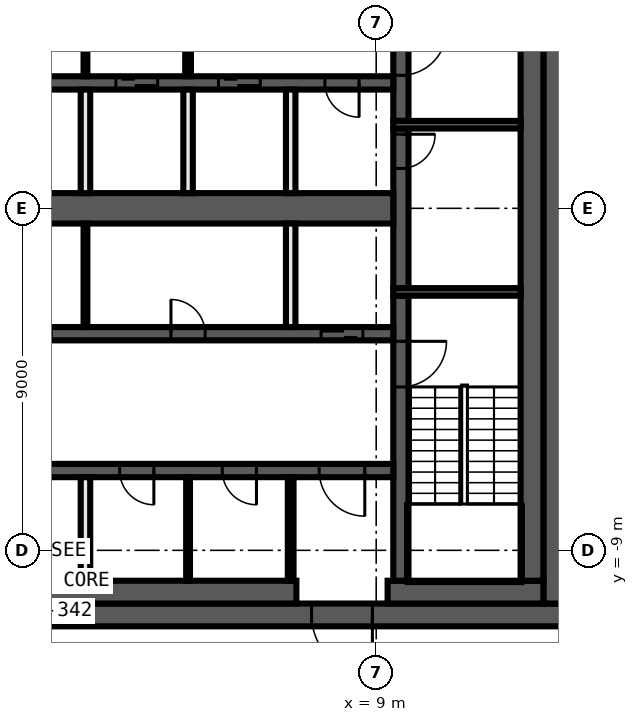
"""IFC4 building model, lengths in metres.
Left out: names, types, materials, properties, quantities, classifications, styles, units other than length and angle.
Written with IfcOpenShell. Run it as: python <this file> out.ifc"""

import sys

from ifc_helpers import new_model, si_unit, direction, frame, frame_2d, origin, place, context, subcontext, project, spatial, rectangle, extrude, element, fill, save


model = new_model("IFC4")
c1 = context("Model", 3, precision=1e-05, world=origin(), true_north=direction((0.0, 1.0)))
c2 = subcontext(c1, "Body", "Model", "MODEL_VIEW")
j1 = project(units=[si_unit("LENGTHUNIT", "METRE"), si_unit("PLANEANGLEUNIT", "RADIAN")], contexts=[c1])
p1 = place(None, origin())
s1 = spatial("IfcSite", under=j1, at=p1, CompositionType="ELEMENT")
p2 = place(p1, origin())
s2 = spatial("IfcBuilding", under=s1, at=p2, CompositionType="ELEMENT")
p3 = place(p2, frame((0.0, 0.0, 359.0)))
s3 = spatial("IfcBuildingStorey", under=s2, at=p3, CompositionType="ELEMENT", Elevation=359.0)
p4 = place(p3, frame((11.367, -20.469, 0.0), z_axis=(0.0, 0.0, 1.0), x_axis=(0.424125024155, 0.905603646131, 0.0)))
e1 = element("IfcWall", 1, at=p4, inside=s3, PredefinedType="SOLIDWALL", context=c2, shape_type="SweptSolid", body=[
    extrude(rectangle(XDim=28.801, YDim=0.25, at=frame_2d((14.401, 0.0))), origin(), (0.0, 0.0, 1.0), 3.8),
])
p5 = place(p3, frame((14.0, -10.7, 0.0), z_axis=(0.0, 0.0, 1.0), x_axis=(-1.0, 0.0, 0.0)))
e2 = element("IfcWall", 2, at=p5, inside=s3, PredefinedType="SHEAR", context=c2, shape_type="SweptSolid", body=[
    extrude(rectangle(XDim=28.0, YDim=0.6, at=frame_2d((14.0, 0.0))), origin(), (0.0, 0.0, 1.0), 3.8),
])
p6 = place(p5, frame((5.1, 0.0, 0.0)))
e3 = element("IfcOpeningElement", 3, at=p6, cuts=e2, PredefinedType="OPENING", context=c2, shape_type="SweptSolid", body=[
    extrude(rectangle(XDim=1.6, YDim=2.1, at=frame_2d((0.8, 1.05))), frame((0.0, 0.31, 0.0), z_axis=(0.0, -1.0, 0.0), x_axis=(1.0, 0.0, 0.0)), (0.0, 0.0, 1.0), 0.62),
])
p7 = place(p3, frame((13.7, 10.4, 0.0), z_axis=(0.0, 0.0, 1.0), x_axis=(0.0, -1.0, 0.0)))
e4 = element("IfcWall", 4, at=p7, inside=s3, PredefinedType="SHEAR", context=c2, shape_type="SweptSolid", body=[
    extrude(rectangle(XDim=20.8, YDim=0.6, at=frame_2d((10.4, 0.0))), origin(), (0.0, 0.0, 1.0), 3.8),
])
p8 = place(p3, frame((13.4, -10.1, 0.0), z_axis=(0.0, 0.0, 1.0), x_axis=(-1.0, 0.0, 0.0)))
e5 = element("IfcWall", 5, at=p8, inside=s3, PredefinedType="SHEAR", context=c2, shape_type="SweptSolid", body=[
    extrude(rectangle(XDim=4.1, YDim=0.6, at=frame_2d((2.05, 0.0))), origin(), (0.0, 0.0, 1.0), 3.8),
])
p9 = place(p3, frame((6.9, -10.1, 0.0), z_axis=(0.0, 0.0, 1.0), x_axis=(-1.0, 0.0, 0.0)))
e6 = element("IfcWall", 6, at=p9, inside=s3, PredefinedType="SHEAR", context=c2, shape_type="SweptSolid", body=[
    extrude(rectangle(XDim=20.3, YDim=0.6, at=frame_2d((10.15, 0.0))), origin(), (0.0, 0.0, 1.0), 3.8),
])
p10 = place(p3, frame((13.1, 9.8, 0.0), z_axis=(0.0, 0.0, 1.0), x_axis=(0.0, -1.0, 0.0)))
e7 = element("IfcWall", 7, at=p10, inside=s3, PredefinedType="SHEAR", context=c2, shape_type="SweptSolid", body=[
    extrude(rectangle(XDim=19.6, YDim=0.6, at=frame_2d((9.8, 0.0))), origin(), (0.0, 0.0, 1.0), 3.8),
])
p11 = place(p3, frame((9.65, -2.3, 0.0), z_axis=(0.0, 0.0, 1.0), x_axis=(0.0, -1.0, 0.0)))
e8 = element("IfcWall", 8, at=p11, inside=s3, PredefinedType="SHEAR", context=c2, shape_type="SweptSolid", body=[
    extrude(rectangle(XDim=7.5, YDim=0.4, at=frame_2d((3.75, 0.0))), origin(), (0.0, 0.0, 1.0), 3.8),
])
p12 = place(p11, frame((1.2, 0.0, 0.0)))
e9 = element("IfcOpeningElement", 9, at=p12, cuts=e8, PredefinedType="OPENING", context=c2, shape_type="SweptSolid", body=[
    extrude(rectangle(XDim=1.2, YDim=2.1, at=frame_2d((0.6, 1.05))), frame((0.0, 0.21, 0.0), z_axis=(0.0, -1.0, 0.0), x_axis=(1.0, 0.0, 0.0)), (0.0, 0.0, 1.0), 0.42),
])
p13 = place(p3, frame((9.65, 2.1, 0.0), z_axis=(0.0, 0.0, 1.0), x_axis=(0.0, -1.0, 0.0)))
e10 = element("IfcWall", 10, at=p13, inside=s3, PredefinedType="SHEAR", context=c2, shape_type="SweptSolid", body=[
    extrude(rectangle(XDim=4.2, YDim=0.4, at=frame_2d((2.1, 0.0))), origin(), (0.0, 0.0, 1.0), 3.8),
])
p14 = place(p13, frame((0.15, 0.0, 0.0)))
e11 = element("IfcOpeningElement", 11, at=p14, cuts=e10, PredefinedType="OPENING", context=c2, shape_type="SweptSolid", body=[
    extrude(rectangle(XDim=0.9, YDim=2.1, at=frame_2d((0.45, 1.05))), frame((0.0, 0.21, 0.0), z_axis=(0.0, -1.0, 0.0), x_axis=(1.0, 0.0, 0.0)), (0.0, 0.0, 1.0), 0.42),
])
p15 = place(p3, frame((9.65, 9.8, 0.0), z_axis=(0.0, 0.0, 1.0), x_axis=(0.0, -1.0, 0.0)))
e12 = element("IfcWall", 12, at=p15, inside=s3, PredefinedType="SHEAR", context=c2, shape_type="SweptSolid", body=[
    extrude(rectangle(XDim=7.5, YDim=0.4, at=frame_2d((3.75, 0.0))), origin(), (0.0, 0.0, 1.0), 3.8),
])
p16 = place(p15, frame((5.1, 0.0, 0.0)))
e13 = element("IfcOpeningElement", 13, at=p16, cuts=e12, PredefinedType="OPENING", context=c2, shape_type="SweptSolid", body=[
    extrude(rectangle(XDim=1.2, YDim=2.1, at=frame_2d((0.6, 1.05))), frame((0.0, 0.21, 0.0), z_axis=(0.0, -1.0, 0.0), x_axis=(1.0, 0.0, 0.0)), (0.0, 0.0, 1.0), 0.42),
])
for number, where, z_axis, x_axis in (
    (14, (9.45, 2.2, 0.0), (0.0, 0.0, 1.0), (1.0, 0.0, 0.0)),
    (15, (9.45, -2.2, 0.0), (0.0, 0.0, 1.0), (1.0, 0.0, 0.0)),
):
    element("IfcWall", number, at=place(p3, frame(where, z_axis=z_axis, x_axis=x_axis)), inside=s3, PredefinedType="SHEAR", context=c2, shape_type="SweptSolid", body=[
        extrude(rectangle(XDim=3.35, YDim=0.2, at=frame_2d((1.675, 0.0))), origin(), (0.0, 0.0, 1.0), 3.8),
    ])
p17 = place(p3, frame((9.45, 3.3, 0.0), z_axis=(0.0, 0.0, 1.0), x_axis=(-1.0, 0.0, 0.0)))
e16 = element("IfcWall", 16, at=p17, inside=s3, PredefinedType="SHEAR", context=c2, shape_type="SweptSolid", body=[
    extrude(rectangle(XDim=18.9, YDim=0.35, at=frame_2d((9.45, 0.0))), origin(), (0.0, 0.0, 1.0), 3.8),
])
p18 = place(p17, frame((6.2, 0.0, 0.0)))
e17 = element("IfcOpeningElement", 17, at=p18, cuts=e16, PredefinedType="OPENING", context=c2, shape_type="SweptSolid", body=[
    extrude(rectangle(XDim=1.1, YDim=2.1, at=frame_2d((0.55, 1.05))), frame((0.0, 0.185, 0.0), z_axis=(0.0, -1.0, 0.0), x_axis=(1.0, 0.0, 0.0)), (0.0, 0.0, 1.0), 0.37),
])
p19 = place(p17, frame((3.5, 0.0, 0.0)))
e18 = element("IfcOpeningElement", 18, at=p19, cuts=e16, PredefinedType="OPENING", context=c2, shape_type="SweptSolid", body=[
    extrude(rectangle(XDim=1.1, YDim=2.1, at=frame_2d((0.55, 1.05))), frame((0.0, 0.185, 0.0), z_axis=(0.0, -1.0, 0.0), x_axis=(1.0, 0.0, 0.0)), (0.0, 0.0, 1.0), 0.37),
])
p20 = place(p17, frame((0.9, 0.0, 0.0)))
e19 = element("IfcOpeningElement", 19, at=p20, cuts=e16, PredefinedType="OPENING", context=c2, shape_type="SweptSolid", body=[
    extrude(rectangle(XDim=0.9, YDim=2.1, at=frame_2d((0.45, 1.05))), frame((0.0, 0.185, 0.0), z_axis=(0.0, -1.0, 0.0), x_axis=(1.0, 0.0, 0.0)), (0.0, 0.0, 1.0), 0.37),
])
p21 = place(p17, frame((17.1, 0.0, 0.0)))
e20 = element("IfcOpeningElement", 20, at=p21, cuts=e16, PredefinedType="OPENING", context=c2, shape_type="SweptSolid", body=[
    extrude(rectangle(XDim=0.9, YDim=2.1, at=frame_2d((0.45, 1.05))), frame((0.0, 0.185, 0.0), z_axis=(0.0, -1.0, 0.0), x_axis=(1.0, 0.0, 0.0)), (0.0, 0.0, 1.0), 0.37),
])
p22 = place(p17, frame((11.7, 0.0, 0.0)))
e21 = element("IfcOpeningElement", 21, at=p22, cuts=e16, PredefinedType="OPENING", context=c2, shape_type="SweptSolid", body=[
    extrude(rectangle(XDim=0.9, YDim=2.1, at=frame_2d((0.45, 1.05))), frame((0.0, 0.185, 0.0), z_axis=(0.0, -1.0, 0.0), x_axis=(1.0, 0.0, 0.0)), (0.0, 0.0, 1.0), 0.37),
])
p23 = place(p3, frame((-9.45, -3.3, 0.0), z_axis=(0.0, 0.0, 1.0), x_axis=(1.0, 0.0, 0.0)))
e22 = element("IfcWall", 22, at=p23, inside=s3, PredefinedType="SHEAR", context=c2, shape_type="SweptSolid", body=[
    extrude(rectangle(XDim=18.9, YDim=0.35, at=frame_2d((9.45, 0.0))), origin(), (0.0, 0.0, 1.0), 3.8),
])
p24 = place(p23, frame((17.0, 0.0, 0.0)))
e23 = element("IfcOpeningElement", 23, at=p24, cuts=e22, PredefinedType="OPENING", context=c2, shape_type="SweptSolid", body=[
    extrude(rectangle(XDim=1.1, YDim=2.1, at=frame_2d((0.55, 1.05))), frame((0.0, 0.185, 0.0), z_axis=(0.0, -1.0, 0.0), x_axis=(1.0, 0.0, 0.0)), (0.0, 0.0, 1.0), 0.37),
])
p25 = place(p23, frame((3.6, 0.0, 0.0)))
e24 = element("IfcOpeningElement", 24, at=p25, cuts=e22, PredefinedType="OPENING", context=c2, shape_type="SweptSolid", body=[
    extrude(rectangle(XDim=0.9, YDim=2.1, at=frame_2d((0.45, 1.05))), frame((0.0, 0.185, 0.0), z_axis=(0.0, -1.0, 0.0), x_axis=(1.0, 0.0, 0.0)), (0.0, 0.0, 1.0), 0.37),
])
p26 = place(p23, frame((9.0, 0.0, 0.0)))
e25 = element("IfcOpeningElement", 25, at=p26, cuts=e22, PredefinedType="OPENING", context=c2, shape_type="SweptSolid", body=[
    extrude(rectangle(XDim=0.9, YDim=2.1, at=frame_2d((0.45, 1.05))), frame((0.0, 0.185, 0.0), z_axis=(0.0, -1.0, 0.0), x_axis=(1.0, 0.0, 0.0)), (0.0, 0.0, 1.0), 0.37),
])
p27 = place(p23, frame((13.05, 0.0, 0.0)))
e26 = element("IfcOpeningElement", 26, at=p27, cuts=e22, PredefinedType="OPENING", context=c2, shape_type="SweptSolid", body=[
    extrude(rectangle(XDim=0.9, YDim=2.1, at=frame_2d((0.45, 1.05))), frame((0.0, 0.185, 0.0), z_axis=(0.0, -1.0, 0.0), x_axis=(1.0, 0.0, 0.0)), (0.0, 0.0, 1.0), 0.37),
])
p28 = place(p3, frame((9.45, -6.9, 0.0), z_axis=(0.0, 0.0, 1.0), x_axis=(-1.0, 0.0, 0.0)))
e27 = element("IfcWall", 27, at=p28, inside=s3, PredefinedType="SHEAR", context=c2, shape_type="SweptSolid", body=[
    extrude(rectangle(XDim=18.9, YDim=0.35, at=frame_2d((9.45, 0.0))), origin(), (0.0, 0.0, 1.0), 3.8),
])
p29 = place(p28, frame((0.75, 0.0, 0.0)))
e28 = element("IfcOpeningElement", 28, at=p29, cuts=e27, PredefinedType="OPENING", context=c2, shape_type="SweptSolid", body=[
    extrude(rectangle(XDim=1.2, YDim=2.1, at=frame_2d((0.6, 1.05))), frame((0.0, 0.185, 0.0), z_axis=(0.0, -1.0, 0.0), x_axis=(1.0, 0.0, 0.0)), (0.0, 0.0, 1.0), 0.37),
])
p30 = place(p28, frame((6.3, 0.0, 0.0)))
e29 = element("IfcOpeningElement", 29, at=p30, cuts=e27, PredefinedType="OPENING", context=c2, shape_type="SweptSolid", body=[
    extrude(rectangle(XDim=0.9, YDim=2.1, at=frame_2d((0.45, 1.05))), frame((0.0, 0.185, 0.0), z_axis=(0.0, -1.0, 0.0), x_axis=(1.0, 0.0, 0.0)), (0.0, 0.0, 1.0), 0.37),
])
p31 = place(p28, frame((3.6, 0.0, 0.0)))
e30 = element("IfcOpeningElement", 30, at=p31, cuts=e27, PredefinedType="OPENING", context=c2, shape_type="SweptSolid", body=[
    extrude(rectangle(XDim=0.9, YDim=2.1, at=frame_2d((0.45, 1.05))), frame((0.0, 0.185, 0.0), z_axis=(0.0, -1.0, 0.0), x_axis=(1.0, 0.0, 0.0)), (0.0, 0.0, 1.0), 0.37),
])
p32 = place(p3, frame((-9.45, 0.0, 0.0), z_axis=(0.0, 0.0, 1.0), x_axis=(1.0, 0.0, 0.0)))
e31 = element("IfcWall", 31, at=p32, inside=s3, PredefinedType="SHEAR", context=c2, shape_type="SweptSolid", body=[
    extrude(rectangle(XDim=18.9, YDim=0.8, at=frame_2d((9.45, 0.0))), origin(), (0.0, 0.0, 1.0), 3.8),
])
p33 = place(p3, frame((6.75, -9.8, 0.0), z_axis=(0.0, 0.0, 1.0), x_axis=(0.0, 1.0, 0.0)))
e32 = element("IfcWall", 32, at=p33, inside=s3, PredefinedType="PARTITIONING", context=c2, shape_type="SweptSolid", body=[
    extrude(rectangle(XDim=2.725, YDim=0.15, at=frame_2d((1.363, 0.0))), origin(), (0.0, 0.0, 1.0), 3.8),
])
for number, where, z_axis, x_axis in (
    (33, (6.75, -3.125, 0.0), (0.0, 0.0, 1.0), (0.0, 1.0, 0.0)),
    (34, (6.75, 0.4, 0.0), (0.0, 0.0, 1.0), (0.0, 1.0, 0.0)),
):
    element("IfcWall", number, at=place(p3, frame(where, z_axis=z_axis, x_axis=x_axis)), inside=s3, PredefinedType="SOLIDWALL", context=c2, shape_type="SweptSolid", body=[
        extrude(rectangle(XDim=2.725, YDim=0.25, at=frame_2d((1.363, 0.0))), origin(), (0.0, 0.0, 1.0), 3.8),
    ])
p34 = place(p3, frame((4.05, 6.725, 0.0), z_axis=(0.0, 0.0, 1.0), x_axis=(0.0, -1.0, 0.0)))
e35 = element("IfcWall", 35, at=p34, inside=s3, PredefinedType="PARTITIONING", context=c2, shape_type="SweptSolid", body=[
    extrude(rectangle(XDim=3.25, YDim=0.15, at=frame_2d((1.625, 0.0))), origin(), (0.0, 0.0, 1.0), 3.8),
])
p35 = place(p34, frame((1.025, 0.0, 0.0)))
e36 = element("IfcOpeningElement", 36, at=p35, cuts=e35, PredefinedType="OPENING", context=c2, shape_type="SweptSolid", body=[
    extrude(rectangle(XDim=1.2, YDim=2.1, at=frame_2d((0.6, 1.05))), frame((0.0, 0.085, 0.0), z_axis=(0.0, -1.0, 0.0), x_axis=(1.0, 0.0, 0.0)), (0.0, 0.0, 1.0), 0.17),
])
p36 = place(p3, frame((4.05, -9.8, 0.0), z_axis=(0.0, 0.0, 1.0), x_axis=(0.0, 1.0, 0.0)))
e37 = element("IfcWall", 37, at=p36, inside=s3, PredefinedType="PARTITIONING", context=c2, shape_type="SweptSolid", body=[
    extrude(rectangle(XDim=2.725, YDim=0.1, at=frame_2d((1.363, 0.0))), origin(), (0.0, 0.0, 1.0), 3.8),
])
p37 = place(p3, frame((4.05, 0.4, 0.0), z_axis=(0.0, 0.0, 1.0), x_axis=(0.0, 1.0, 0.0)))
e38 = element("IfcWall", 38, at=p37, inside=s3, PredefinedType="SOLIDWALL", context=c2, shape_type="SweptSolid", body=[
    extrude(rectangle(XDim=2.725, YDim=0.25, at=frame_2d((1.363, 0.0))), origin(), (0.0, 0.0, 1.0), 3.8),
])
p38 = place(p3, frame((1.35, -3.125, 0.0), z_axis=(0.0, 0.0, 1.0), x_axis=(0.0, 1.0, 0.0)))
e39 = element("IfcWall", 39, at=p38, inside=s3, PredefinedType="PARTITIONING", context=c2, shape_type="SweptSolid", body=[
    extrude(rectangle(XDim=2.725, YDim=0.1, at=frame_2d((1.363, 0.0))), origin(), (0.0, 0.0, 1.0), 3.8),
])
p39 = place(p3, frame((1.35, 6.725, 0.0), z_axis=(0.0, 0.0, 1.0), x_axis=(0.0, -1.0, 0.0)))
e40 = element("IfcWall", 40, at=p39, inside=s3, PredefinedType="PARTITIONING", context=c2, shape_type="SweptSolid", body=[
    extrude(rectangle(XDim=3.25, YDim=0.1, at=frame_2d((1.625, 0.0))), origin(), (0.0, 0.0, 1.0), 3.8),
])
p40 = place(p39, frame((1.025, 0.0, 0.0)))
e41 = element("IfcOpeningElement", 41, at=p40, cuts=e40, PredefinedType="OPENING", context=c2, shape_type="SweptSolid", body=[
    extrude(rectangle(XDim=1.2, YDim=2.1, at=frame_2d((0.6, 1.05))), frame((0.0, 0.06, 0.0), z_axis=(0.0, -1.0, 0.0), x_axis=(1.0, 0.0, 0.0)), (0.0, 0.0, 1.0), 0.12),
])
for number, where, z_axis, x_axis in (
    (42, (1.35, -9.8, 0.0), (0.0, 0.0, 1.0), (0.0, 1.0, 0.0)),
    (43, (1.35, 0.4, 0.0), (0.0, 0.0, 1.0), (0.0, 1.0, 0.0)),
):
    element("IfcWall", number, at=place(p3, frame(where, z_axis=z_axis, x_axis=x_axis)), inside=s3, PredefinedType="SOLIDWALL", context=c2, shape_type="SweptSolid", body=[
        extrude(rectangle(XDim=2.725, YDim=0.25, at=frame_2d((1.363, 0.0))), origin(), (0.0, 0.0, 1.0), 3.8),
    ])
p41 = place(p14, origin())
e44 = element("IfcDoor", 44, at=p41, inside=s3, OperationType="SINGLE_SWING_RIGHT", PredefinedType="DOOR", context=c2, shape_type="SweptSolid", body=[
    extrude(rectangle(XDim=0.9, YDim=2.1, at=frame_2d((0.45, 1.05))), frame((0.0, 0.025, 0.0), z_axis=(0.0, -1.0, 0.0), x_axis=(1.0, 0.0, 0.0)), (0.0, 0.0, 1.0), 0.05),
])
fill(e11, e44)
p42 = place(p18, origin())
e45 = element("IfcDoor", 45, at=p42, inside=s3, OperationType="DOUBLE_DOOR_SLIDING", PredefinedType="DOOR", context=c2, shape_type="SweptSolid", body=[
    extrude(rectangle(XDim=1.1, YDim=2.1, at=frame_2d((0.55, 1.05))), frame((0.0, 0.025, 0.0), z_axis=(0.0, -1.0, 0.0), x_axis=(1.0, 0.0, 0.0)), (0.0, 0.0, 1.0), 0.05),
])
fill(e17, e45)
p43 = place(p19, origin())
e46 = element("IfcDoor", 46, at=p43, inside=s3, OperationType="DOUBLE_DOOR_SLIDING", PredefinedType="DOOR", context=c2, shape_type="SweptSolid", body=[
    extrude(rectangle(XDim=1.1, YDim=2.1, at=frame_2d((0.55, 1.05))), frame((0.0, 0.025, 0.0), z_axis=(0.0, -1.0, 0.0), x_axis=(1.0, 0.0, 0.0)), (0.0, 0.0, 1.0), 0.05),
])
fill(e18, e46)
p44 = place(p20, origin())
e47 = element("IfcDoor", 47, at=p44, inside=s3, OperationType="SINGLE_SWING_LEFT", PredefinedType="DOOR", context=c2, shape_type="SweptSolid", body=[
    extrude(rectangle(XDim=0.9, YDim=2.1, at=frame_2d((0.45, 1.05))), frame((0.0, 0.025, 0.0), z_axis=(0.0, -1.0, 0.0), x_axis=(1.0, 0.0, 0.0)), (0.0, 0.0, 1.0), 0.05),
])
fill(e19, e47)
p45 = place(p24, origin())
e48 = element("IfcDoor", 48, at=p45, inside=s3, OperationType="DOUBLE_DOOR_SLIDING", PredefinedType="DOOR", context=c2, shape_type="SweptSolid", body=[
    extrude(rectangle(XDim=1.1, YDim=2.1, at=frame_2d((0.55, 1.05))), frame((0.0, 0.025, 0.0), z_axis=(0.0, -1.0, 0.0), x_axis=(1.0, 0.0, 0.0)), (0.0, 0.0, 1.0), 0.05),
])
fill(e23, e48)
p46 = place(p6, origin())
e49 = element("IfcDoor", 49, at=p46, inside=s3, OperationType="DOUBLE_DOOR_SINGLE_SWING", PredefinedType="DOOR", context=c2, shape_type="SweptSolid", body=[
    extrude(rectangle(XDim=1.6, YDim=2.1, at=frame_2d((0.8, 1.05))), frame((0.0, 0.025, 0.0), z_axis=(0.0, -1.0, 0.0), x_axis=(1.0, 0.0, 0.0)), (0.0, 0.0, 1.0), 0.05),
])
fill(e3, e49)
p47 = place(p29, origin())
e50 = element("IfcDoor", 50, at=p47, inside=s3, OperationType="SINGLE_SWING_LEFT", PredefinedType="DOOR", context=c2, shape_type="SweptSolid", body=[
    extrude(rectangle(XDim=1.2, YDim=2.1, at=frame_2d((0.6, 1.05))), frame((0.0, 0.025, 0.0), z_axis=(0.0, -1.0, 0.0), x_axis=(1.0, 0.0, 0.0)), (0.0, 0.0, 1.0), 0.05),
])
fill(e28, e50)
p48 = place(p27, origin())
e51 = element("IfcDoor", 51, at=p48, inside=s3, OperationType="SINGLE_SWING_RIGHT", PredefinedType="DOOR", context=c2, shape_type="SweptSolid", body=[
    extrude(rectangle(XDim=0.9, YDim=2.1, at=frame_2d((0.45, 1.05))), frame((0.0, 0.025, 0.0), z_axis=(0.0, -1.0, 0.0), x_axis=(1.0, 0.0, 0.0)), (0.0, 0.0, 1.0), 0.05),
])
fill(e26, e51)
p49 = place(p30, origin())
e52 = element("IfcDoor", 52, at=p49, inside=s3, OperationType="SINGLE_SWING_LEFT", PredefinedType="DOOR", context=c2, shape_type="SweptSolid", body=[
    extrude(rectangle(XDim=0.9, YDim=2.1, at=frame_2d((0.45, 1.05))), frame((0.0, 0.025, 0.0), z_axis=(0.0, -1.0, 0.0), x_axis=(1.0, 0.0, 0.0)), (0.0, 0.0, 1.0), 0.05),
])
fill(e29, e52)
p50 = place(p31, origin())
e53 = element("IfcDoor", 53, at=p50, inside=s3, OperationType="SINGLE_SWING_RIGHT", PredefinedType="DOOR", context=c2, shape_type="SweptSolid", body=[
    extrude(rectangle(XDim=0.9, YDim=2.1, at=frame_2d((0.45, 1.05))), frame((0.0, 0.025, 0.0), z_axis=(0.0, -1.0, 0.0), x_axis=(1.0, 0.0, 0.0)), (0.0, 0.0, 1.0), 0.05),
])
fill(e30, e53)
p51 = place(p16, origin())
e54 = element("IfcDoor", 54, at=p51, inside=s3, OperationType="SINGLE_SWING_LEFT", PredefinedType="DOOR", context=c2, shape_type="SweptSolid", body=[
    extrude(rectangle(XDim=1.2, YDim=2.1, at=frame_2d((0.6, 1.05))), frame((0.0, 0.025, 0.0), z_axis=(0.0, -1.0, 0.0), x_axis=(1.0, 0.0, 0.0)), (0.0, 0.0, 1.0), 0.05),
])
fill(e13, e54)
p52 = place(p12, origin())
e55 = element("IfcDoor", 55, at=p52, inside=s3, OperationType="SINGLE_SWING_RIGHT", PredefinedType="DOOR", context=c2, shape_type="SweptSolid", body=[
    extrude(rectangle(XDim=1.2, YDim=2.1, at=frame_2d((0.6, 1.05))), frame((0.0, 0.025, 0.0), z_axis=(0.0, -1.0, 0.0), x_axis=(1.0, 0.0, 0.0)), (0.0, 0.0, 1.0), 0.05),
])
fill(e9, e55)
save(model, sys.argv[1])
